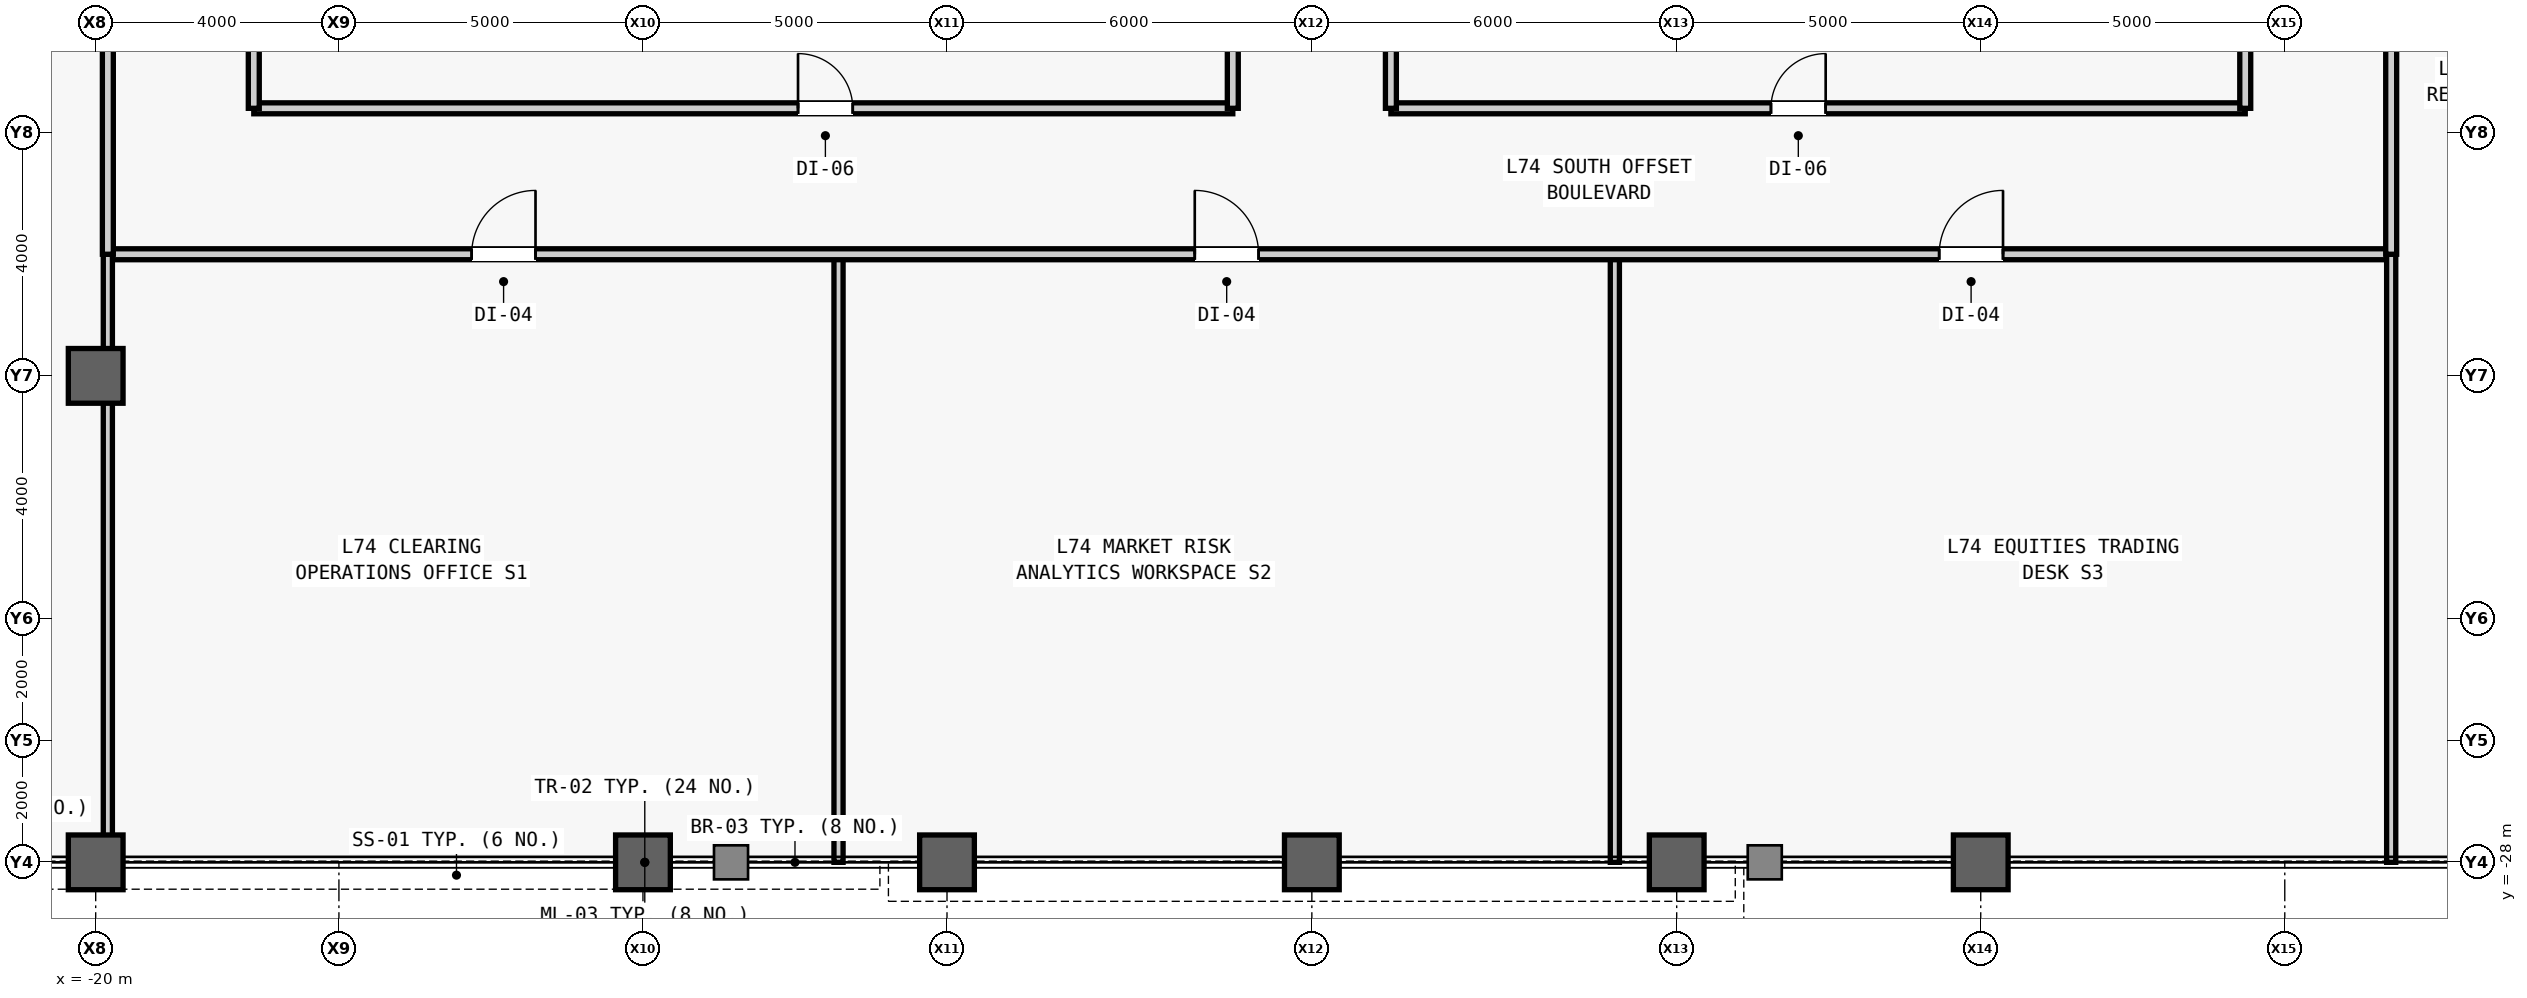
"""IFC4 building model, lengths in metres.
Left out: names, types, materials, properties, quantities, classifications, styles, units other than length and angle.
Written with IfcOpenShell. Run it as: python <this file> out.ifc"""

import sys

from ifc_helpers import new_model, si_unit, direction, frame, frame_2d, origin, origin_2d, place, context, subcontext, project, spatial, rectangle, hollow_rectangle, extrude, source, transform, mapped, element, fill, save


model = new_model("IFC4")
c1 = context("Model", 3, precision=1e-05, world=origin(), true_north=direction((0.0, 1.0)))
c2 = subcontext(c1, "Body", "Model", "MODEL_VIEW")
j1 = project(units=[si_unit("LENGTHUNIT", "METRE"), si_unit("PLANEANGLEUNIT", "RADIAN")], contexts=[c1])
p1 = place(None, origin())
s1 = spatial("IfcSite", under=j1, at=p1, CompositionType="ELEMENT")
p2 = place(p1, origin())
s2 = spatial("IfcBuilding", under=s1, at=p2, CompositionType="ELEMENT")
p3 = place(p2, frame((0.0, 0.0, 313.5)))
s3 = spatial("IfcBuildingStorey", under=s2, at=p3, CompositionType="ELEMENT", Elevation=313.5)
m1 = source(origin(), c2, "Body", "SweptSolid", [
    extrude(hollow_rectangle(XDim=0.9, YDim=0.9, WallThickness=0.05, at=origin_2d()), origin(), (0.0, 0.0, 1.0), 4.0),
])
for number, where, z_axis, x_axis in (
    (1, (-20.0, -28.0, 0.0), (0.0, 0.0, 1.0), (1.0, 0.0, 0.0)),
    (2, (-20.0, -20.0, 0.0), (0.0, 0.0, 1.0), (1.0, 0.0, 0.0)),
    (3, (-11.0, -28.0, 0.0), (0.0, 0.0, 1.0), (1.0, 0.0, 0.0)),
    (4, (-6.0, -28.0, 0.0), (0.0, 0.0, 1.0), (1.0, 0.0, 0.0)),
    (5, (0.0, -28.0, 0.0), (0.0, 0.0, 1.0), (1.0, 0.0, 0.0)),
    (6, (6.0, -28.0, 0.0), (0.0, 0.0, 1.0), (1.0, 0.0, 0.0)),
    (7, (11.0, -28.0, 0.0), (0.0, 0.0, 1.0), (1.0, 0.0, 0.0)),
):
    element("IfcColumn", number, at=place(p3, frame(where, z_axis=z_axis, x_axis=x_axis)), inside=s3, PredefinedType="COLUMN", context=c2, shape_type="MappedRepresentation", body=[
        mapped(m1, transform((0.0, 0.0, 0.0), scale=1.0)),
    ])
m2 = source(origin(), c2, "Body", "SweptSolid", [
    extrude(rectangle(XDim=16.1, YDim=0.18, at=frame_2d((8.05, 0.0))), origin(), (0.0, 0.0, 1.0), 3.78),
])
p4 = place(p3, frame((-17.4, -15.6, 0.0), z_axis=(0.0, 0.0, 1.0), x_axis=(1.0, 0.0, 0.0)))
e8 = element("IfcWall", 8, at=p4, inside=s3, PredefinedType="PARTITIONING", context=c2, shape_type="MappedRepresentation", body=[
    mapped(m2, transform((0.0, 0.0, 0.0), scale=1.0)),
])
m3 = source(origin(), c2, "Body", "SweptSolid", [
    extrude(rectangle(XDim=0.9, YDim=2.15, at=frame_2d((0.45, 1.075))), frame((0.0, 0.1, 0.0), z_axis=(0.0, -1.0, 0.0), x_axis=(1.0, 0.0, 0.0)), (0.0, 0.0, 1.0), 0.2),
])
p5 = place(p4, frame((8.95, 0.0, 0.0)))
e9 = element("IfcOpeningElement", 9, at=p5, cuts=e8, PredefinedType="OPENING", context=c2, shape_type="MappedRepresentation", body=[
    mapped(m3, transform((0.0, 0.0, 0.0), scale=1.0)),
])
m4 = source(origin(), c2, "Body", "SweptSolid", [
    extrude(rectangle(XDim=5.8, YDim=0.18, at=frame_2d((2.9, 0.0))), origin(), (0.0, 0.0, 1.0), 3.78),
])
p6 = place(p3, frame((-17.4, -15.6, 0.0), z_axis=(0.0, 0.0, 1.0), x_axis=(0.0, 1.0, 0.0)))
e10 = element("IfcWall", 10, at=p6, inside=s3, PredefinedType="PARTITIONING", context=c2, shape_type="MappedRepresentation", body=[
    mapped(m4, transform((0.0, 0.0, 0.0), scale=1.0)),
])
m5 = source(origin(), c2, "Body", "SweptSolid", [
    extrude(rectangle(XDim=4.6, YDim=0.18, at=frame_2d((2.3, 0.0))), origin(), (0.0, 0.0, 1.0), 3.78),
])
p7 = place(p3, frame((-1.3, -15.6, 0.0), z_axis=(0.0, 0.0, 1.0), x_axis=(0.0, 1.0, 0.0)))
e11 = element("IfcWall", 11, at=p7, inside=s3, PredefinedType="PARTITIONING", context=c2, shape_type="MappedRepresentation", body=[
    mapped(m5, transform((0.0, 0.0, 0.0), scale=1.0)),
])
m6 = source(origin(), c2, "Body", "SweptSolid", [
    extrude(rectangle(XDim=14.05, YDim=0.18, at=frame_2d((7.025, 0.0))), origin(), (0.0, 0.0, 1.0), 3.78),
])
p8 = place(p3, frame((1.3, -15.6, 0.0), z_axis=(0.0, 0.0, 1.0), x_axis=(1.0, 0.0, 0.0)))
e12 = element("IfcWall", 12, at=p8, inside=s3, PredefinedType="PARTITIONING", context=c2, shape_type="MappedRepresentation", body=[
    mapped(m6, transform((0.0, 0.0, 0.0), scale=1.0)),
])
p9 = place(p8, frame((6.25, 0.0, 0.0)))
e13 = element("IfcOpeningElement", 13, at=p9, cuts=e12, PredefinedType="OPENING", context=c2, shape_type="MappedRepresentation", body=[
    mapped(m3, transform((0.0, 0.0, 0.0), scale=1.0)),
])
p10 = place(p3, frame((1.3, -15.6, 0.0), z_axis=(0.0, 0.0, 1.0), x_axis=(0.0, 1.0, 0.0)))
e14 = element("IfcWall", 14, at=p10, inside=s3, PredefinedType="PARTITIONING", context=c2, shape_type="MappedRepresentation", body=[
    mapped(m5, transform((0.0, 0.0, 0.0), scale=1.0)),
])
m7 = source(origin(), c2, "Body", "SweptSolid", [
    extrude(rectangle(XDim=5.1, YDim=0.18, at=frame_2d((2.55, 0.0))), origin(), (0.0, 0.0, 1.0), 3.78),
])
p11 = place(p3, frame((15.35, -15.6, 0.0), z_axis=(0.0, 0.0, 1.0), x_axis=(0.0, 1.0, 0.0)))
e15 = element("IfcWall", 15, at=p11, inside=s3, PredefinedType="PARTITIONING", context=c2, shape_type="MappedRepresentation", body=[
    mapped(m7, transform((0.0, 0.0, 0.0), scale=1.0)),
])
m8 = source(origin(), c2, "Body", "SweptSolid", [
    extrude(rectangle(XDim=10.0, YDim=0.15, at=frame_2d((5.0, 0.0))), origin(), (0.0, 0.0, 1.0), 3.78),
])
for number, where, z_axis, x_axis in (
    (16, (-7.784, -28.0, 0.0), (0.0, 0.0, 1.0), (0.0, 1.0, 0.0)),
    (17, (4.983, -28.0, 0.0), (0.0, 0.0, 1.0), (0.0, 1.0, 0.0)),
):
    element("IfcWall", number, at=place(p3, frame(where, z_axis=z_axis, x_axis=x_axis)), inside=s3, PredefinedType="PARTITIONING", context=c2, shape_type="MappedRepresentation", body=[
        mapped(m8, transform((0.0, 0.0, 0.0), scale=1.0)),
    ])
m9 = source(origin(), c2, "Body", "SweptSolid", [
    extrude(rectangle(XDim=37.55, YDim=0.18, at=frame_2d((18.775, 0.0))), origin(), (0.0, 0.0, 1.0), 3.78),
])
p12 = place(p3, frame((-19.8, -18.0, 0.0), z_axis=(0.0, 0.0, 1.0), x_axis=(1.0, 0.0, 0.0)))
e18 = element("IfcWall", 18, at=p12, inside=s3, PredefinedType="PARTITIONING", context=c2, shape_type="MappedRepresentation", body=[
    mapped(m9, transform((0.0, 0.0, 0.0), scale=1.0)),
])
m10 = source(origin(), c2, "Body", "SweptSolid", [
    extrude(rectangle(XDim=1.05, YDim=2.2, at=frame_2d((0.525, 1.1))), frame((0.0, 0.1, 0.0), z_axis=(0.0, -1.0, 0.0), x_axis=(1.0, 0.0, 0.0)), (0.0, 0.0, 1.0), 0.2),
])
p13 = place(p12, frame((5.983, 0.0, 0.0)))
e19 = element("IfcOpeningElement", 19, at=p13, cuts=e18, PredefinedType="OPENING", context=c2, shape_type="MappedRepresentation", body=[
    mapped(m10, transform((0.0, 0.0, 0.0), scale=1.0)),
])
p14 = place(p12, frame((17.875, 0.0, 0.0)))
e20 = element("IfcOpeningElement", 20, at=p14, cuts=e18, PredefinedType="OPENING", context=c2, shape_type="MappedRepresentation", body=[
    mapped(m10, transform((0.0, 0.0, 0.0), scale=1.0)),
])
p15 = place(p12, frame((30.116, 0.0, 0.0)))
e21 = element("IfcOpeningElement", 21, at=p15, cuts=e18, PredefinedType="OPENING", context=c2, shape_type="MappedRepresentation", body=[
    mapped(m10, transform((0.0, 0.0, 0.0), scale=1.0)),
])
m11 = source(origin(), c2, "Body", "SweptSolid", [
    extrude(rectangle(XDim=10.0, YDim=0.15, at=frame_2d((5.0, 0.0))), origin(), (0.0, 0.0, 1.0), 3.164),
])
p16 = place(p3, frame((-19.8, -28.0, 0.0), z_axis=(0.0, 0.0, 1.0), x_axis=(0.0, 1.0, 0.0)))
e22 = element("IfcWall", 22, at=p16, inside=s3, PredefinedType="PARTITIONING", context=c2, shape_type="MappedRepresentation", body=[
    mapped(m11, transform((0.0, 0.0, 0.0), scale=1.0)),
])
p17 = place(p3, frame((17.75, -28.0, 0.0), z_axis=(0.0, 0.0, 1.0), x_axis=(0.0, 1.0, 0.0)))
e23 = element("IfcWall", 23, at=p17, inside=s3, PredefinedType="PARTITIONING", context=c2, shape_type="MappedRepresentation", body=[
    mapped(m8, transform((0.0, 0.0, 0.0), scale=1.0)),
])
m12 = source(origin(), c2, "Body", "SweptSolid", [
    extrude(rectangle(XDim=40.5, YDim=0.18, at=frame_2d((20.25, 0.0))), origin(), (0.0, 0.0, 1.0), 3.164),
])
p18 = place(p3, frame((-19.8, -18.0, 0.0), z_axis=(0.0, 0.0, 1.0), x_axis=(0.0, 1.0, 0.0)))
e24 = element("IfcWall", 24, at=p18, inside=s3, PredefinedType="PARTITIONING", context=c2, shape_type="MappedRepresentation", body=[
    mapped(m12, transform((0.0, 0.0, 0.0), scale=1.0)),
])
m13 = source(origin(), c2, "Body", "SweptSolid", [
    extrude(rectangle(XDim=0.95, YDim=2.15, at=frame_2d((0.475, 1.075))), frame((0.0, 0.1, 0.0), z_axis=(0.0, -1.0, 0.0), x_axis=(1.0, 0.0, 0.0)), (0.0, 0.0, 1.0), 0.2),
])
p19 = place(p18, frame((5.657, 0.0, 0.0)))
e25 = element("IfcOpeningElement", 25, at=p19, cuts=e24, PredefinedType="OPENING", context=c2, shape_type="MappedRepresentation", body=[
    mapped(m13, transform((0.0, 0.0, 0.0), scale=1.0)),
])
p20 = place(p18, frame((13.157, 0.0, 0.0)))
e26 = element("IfcOpeningElement", 26, at=p20, cuts=e24, PredefinedType="OPENING", context=c2, shape_type="MappedRepresentation", body=[
    mapped(m13, transform((0.0, 0.0, 0.0), scale=1.0)),
])
p21 = place(p18, frame((21.893, 0.0, 0.0)))
e27 = element("IfcOpeningElement", 27, at=p21, cuts=e24, PredefinedType="OPENING", context=c2, shape_type="MappedRepresentation", body=[
    mapped(m13, transform((0.0, 0.0, 0.0), scale=1.0)),
])
p22 = place(p18, frame((29.393, 0.0, 0.0)))
e28 = element("IfcOpeningElement", 28, at=p22, cuts=e24, PredefinedType="OPENING", context=c2, shape_type="MappedRepresentation", body=[
    mapped(m13, transform((0.0, 0.0, 0.0), scale=1.0)),
])
m14 = source(origin(), c2, "Body", "SweptSolid", [
    extrude(rectangle(XDim=40.5, YDim=0.18, at=frame_2d((20.25, 0.0))), origin(), (0.0, 0.0, 1.0), 3.78),
])
p23 = place(p3, frame((17.75, -18.0, 0.0), z_axis=(0.0, 0.0, 1.0), x_axis=(0.0, 1.0, 0.0)))
e29 = element("IfcWall", 29, at=p23, inside=s3, PredefinedType="PARTITIONING", context=c2, shape_type="MappedRepresentation", body=[
    mapped(m14, transform((0.0, 0.0, 0.0), scale=1.0)),
])
p24 = place(p23, frame((6.021, 0.0, 0.0)))
e30 = element("IfcOpeningElement", 30, at=p24, cuts=e29, PredefinedType="OPENING", context=c2, shape_type="MappedRepresentation", body=[
    mapped(m13, transform((0.0, 0.0, 0.0), scale=1.0)),
])
p25 = place(p23, frame((14.481, 0.0, 0.0)))
e31 = element("IfcOpeningElement", 31, at=p25, cuts=e29, PredefinedType="OPENING", context=c2, shape_type="MappedRepresentation", body=[
    mapped(m13, transform((0.0, 0.0, 0.0), scale=1.0)),
])
p26 = place(p23, frame((24.985, 0.0, 0.0)))
e32 = element("IfcOpeningElement", 32, at=p26, cuts=e29, PredefinedType="OPENING", context=c2, shape_type="MappedRepresentation", body=[
    mapped(m13, transform((0.0, 0.0, 0.0), scale=1.0)),
])
m15 = source(origin(), c2, "Body", "SweptSolid", [
    extrude(rectangle(XDim=0.9, YDim=2.15, at=frame_2d((0.45, 1.075))), frame((0.0, 0.025, 0.0), z_axis=(0.0, -1.0, 0.0), x_axis=(1.0, 0.0, 0.0)), (0.0, 0.0, 1.0), 0.05),
])
p27 = place(p5, origin())
e33 = element("IfcDoor", 33, at=p27, inside=s3, OperationType="SINGLE_SWING_LEFT", PredefinedType="DOOR", context=c2, shape_type="MappedRepresentation", body=[
    mapped(m15, transform((0.0, 0.0, 0.0), scale=1.0)),
])
fill(e9, e33)
p28 = place(p9, origin())
e34 = element("IfcDoor", 34, at=p28, inside=s3, OperationType="SINGLE_SWING_RIGHT", PredefinedType="DOOR", context=c2, shape_type="MappedRepresentation", body=[
    mapped(m15, transform((0.0, 0.0, 0.0), scale=1.0)),
])
fill(e13, e34)
m16 = source(origin(), c2, "Body", "SweptSolid", [
    extrude(rectangle(XDim=1.05, YDim=2.2, at=frame_2d((0.525, 1.1))), frame((0.0, 0.025, 0.0), z_axis=(0.0, -1.0, 0.0), x_axis=(1.0, 0.0, 0.0)), (0.0, 0.0, 1.0), 0.05),
])
p29 = place(p13, origin())
e35 = element("IfcDoor", 35, at=p29, inside=s3, OperationType="SINGLE_SWING_RIGHT", PredefinedType="DOOR", context=c2, shape_type="MappedRepresentation", body=[
    mapped(m16, transform((0.0, 0.0, 0.0), scale=1.0)),
])
fill(e19, e35)
p30 = place(p14, origin())
e36 = element("IfcDoor", 36, at=p30, inside=s3, OperationType="SINGLE_SWING_LEFT", PredefinedType="DOOR", context=c2, shape_type="MappedRepresentation", body=[
    mapped(m16, transform((0.0, 0.0, 0.0), scale=1.0)),
])
fill(e20, e36)
p31 = place(p15, origin())
e37 = element("IfcDoor", 37, at=p31, inside=s3, OperationType="SINGLE_SWING_RIGHT", PredefinedType="DOOR", context=c2, shape_type="MappedRepresentation", body=[
    mapped(m16, transform((0.0, 0.0, 0.0), scale=1.0)),
])
fill(e21, e37)
save(model, sys.argv[1])
